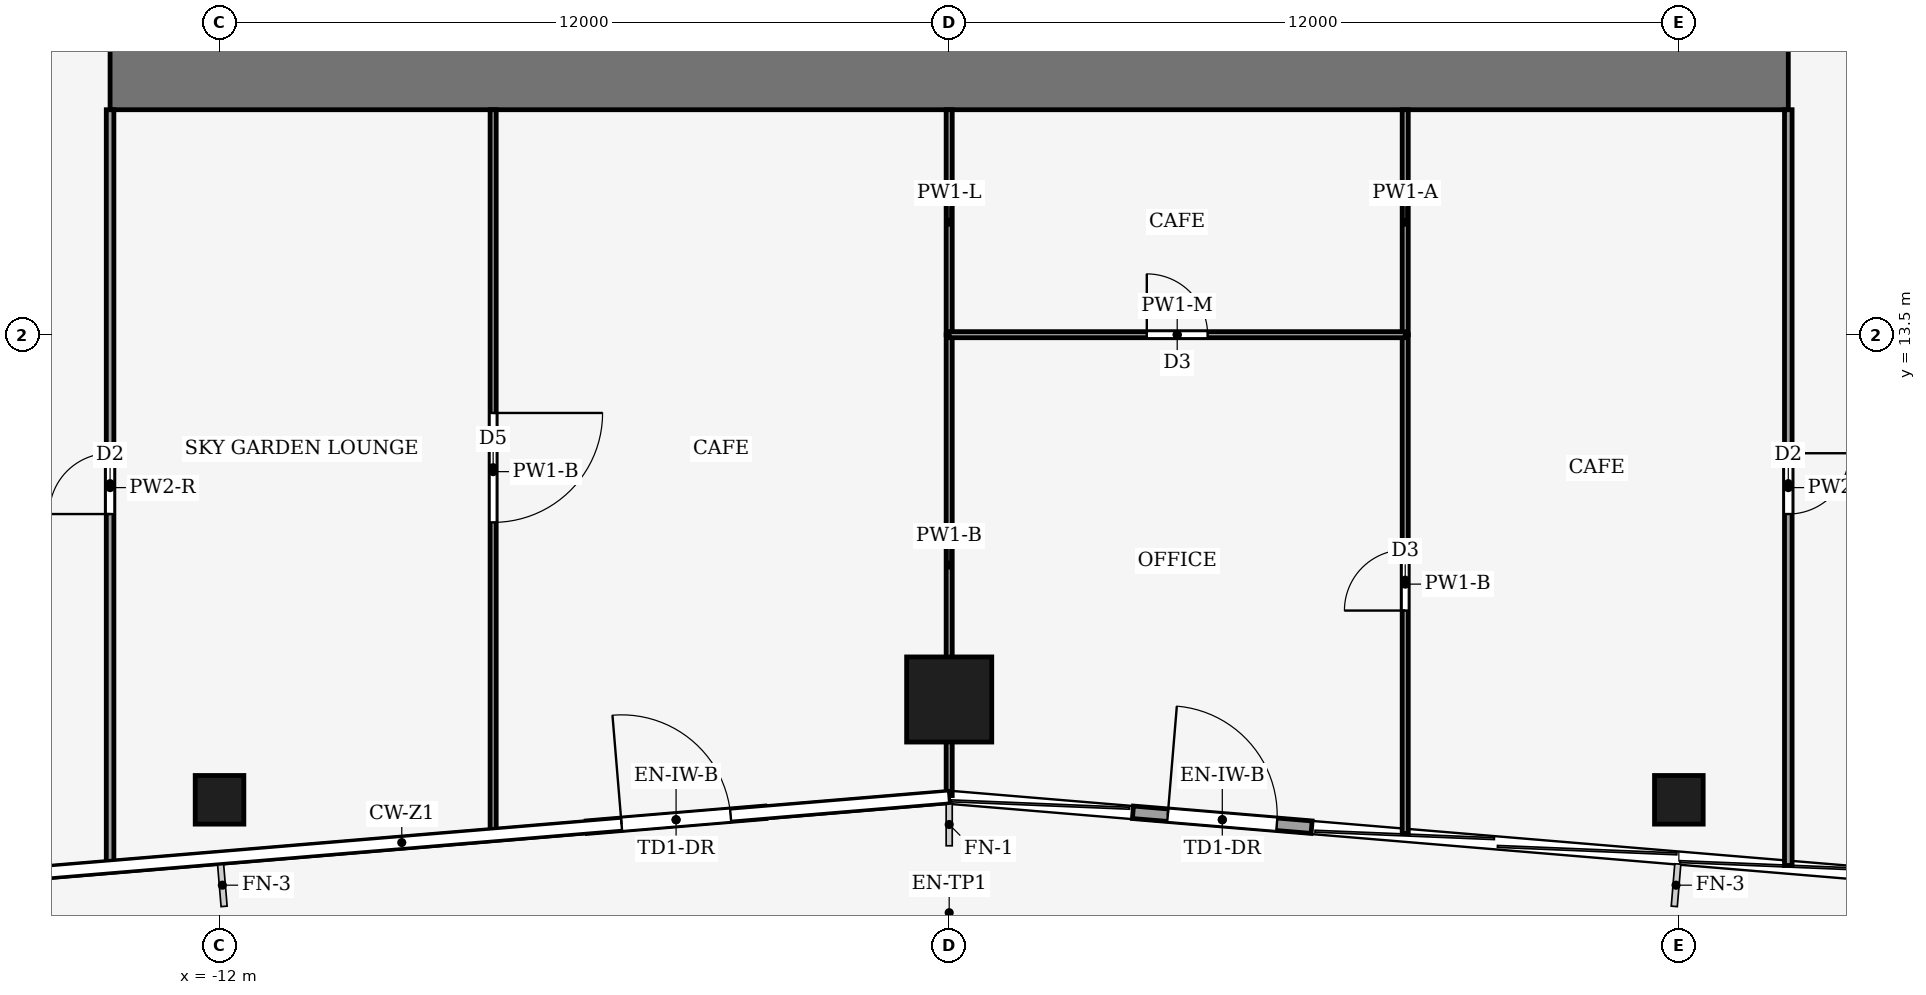
"""IFC4 building model, lengths in metres.
Left out: names, types, materials, properties, quantities, classifications, styles, units other than length and angle.
Written with IfcOpenShell. Run it as: python <this file> out.ifc"""

import sys

from ifc_helpers import new_model, si_unit, direction, frame, frame_2d, origin, origin_2d, place, context, subcontext, project, spatial, rectangle, hollow_rectangle, extrude, element, fill, save


model = new_model("IFC4")
c1 = context("Model", 3, precision=1e-05, world=origin(), true_north=direction((0.0, 1.0)))
c2 = subcontext(c1, "Body", "Model", "MODEL_VIEW")
j1 = project(units=[si_unit("LENGTHUNIT", "METRE"), si_unit("PLANEANGLEUNIT", "RADIAN")], contexts=[c1])
p1 = place(None, origin())
s1 = spatial("IfcSite", under=j1, at=p1, CompositionType="ELEMENT")
p2 = place(p1, origin())
s2 = spatial("IfcBuilding", under=s1, at=p2, CompositionType="ELEMENT")
p3 = place(p2, frame((0.0, 0.0, 65.0)))
s3 = spatial("IfcBuildingStorey", under=s2, at=p3, CompositionType="ELEMENT", Elevation=65.0)
p4 = place(p3, frame((-13.8, 17.8, -0.13), z_axis=(0.0, 0.0, 1.0), x_axis=(1.0, 0.0, 0.0)))
e1 = element("IfcWall", 1, at=p4, inside=s3, PredefinedType="SHEAR", context=c2, shape_type="SweptSolid", body=[
    extrude(rectangle(XDim=27.6, YDim=1.2, at=frame_2d((13.8, 0.0))), origin(), (0.0, 0.0, 1.0), 5.0),
])
p5 = place(p3, frame((0.0, 7.5, 0.0), z_axis=(0.0, 0.0, 1.0), x_axis=(1.0, 0.0, 0.0)))
e2 = element("IfcColumn", 2, at=p5, inside=s3, PredefinedType="COLUMN", context=c2, shape_type="SweptSolid", body=[
    extrude(hollow_rectangle(XDim=1.4, YDim=1.4, WallThickness=0.08, at=origin_2d()), origin(), (0.0, 0.0, 1.0), 5.0),
])
for number, where, z_axis, x_axis in (
    (3, (-12.0, 5.85, 0.0), (0.0, 0.0, 1.0), (1.0, 0.0, 0.0)),
    (4, (12.0, 5.85, 0.0), (0.0, 0.0, 1.0), (1.0, 0.0, 0.0)),
):
    element("IfcColumn", number, at=place(p3, frame(where, z_axis=z_axis, x_axis=x_axis)), inside=s3, PredefinedType="COLUMN", context=c2, shape_type="SweptSolid", body=[
        extrude(hollow_rectangle(XDim=0.8, YDim=0.8, WallThickness=0.04, at=origin_2d()), origin(), (0.0, 0.0, 1.0), 5.0),
    ])
p6 = place(p3, frame((-5.96, 5.4, 0.0), z_axis=(0.0, 0.0, 1.0), x_axis=(0.996544615933, 0.083059186453, 0.0)))
e5 = element("IfcWall", 5, at=p6, inside=s3, PredefinedType="SOLIDWALL", context=c2, shape_type="SweptSolid", body=[
    extrude(rectangle(XDim=2.948, YDim=0.206, at=frame_2d((1.474, 0.0))), origin(), (0.0, 0.0, 1.0), 4.65),
])
p7 = place(p6, frame((0.574, 0.0, 0.0)))
e6 = element("IfcOpeningElement", 6, at=p7, cuts=e5, PredefinedType="OPENING", context=c2, shape_type="SweptSolid", body=[
    extrude(rectangle(XDim=1.8, YDim=2.4, at=frame_2d((0.9, 1.2))), frame((0.0, 0.113, 0.0), z_axis=(0.0, -1.0, 0.0), x_axis=(1.0, 0.0, 0.0)), (0.0, 0.0, 1.0), 0.226),
])
p8 = place(p3, frame((3.022, 5.645, 0.0), z_axis=(0.0, 0.0, 1.0), x_axis=(0.996544615933, -0.083059186453, 0.0)))
e7 = element("IfcWall", 7, at=p8, inside=s3, PredefinedType="SOLIDWALL", context=c2, shape_type="SweptSolid", body=[
    extrude(rectangle(XDim=2.948, YDim=0.206, at=frame_2d((1.474, 0.0))), origin(), (0.0, 0.0, 1.0), 4.65),
])
p9 = place(p8, frame((0.574, 0.0, 0.0)))
e8 = element("IfcOpeningElement", 8, at=p9, cuts=e7, PredefinedType="OPENING", context=c2, shape_type="SweptSolid", body=[
    extrude(rectangle(XDim=1.8, YDim=2.4, at=frame_2d((0.9, 1.2))), frame((0.0, 0.113, 0.0), z_axis=(0.0, -1.0, 0.0), x_axis=(1.0, 0.0, 0.0)), (0.0, 0.0, 1.0), 0.226),
])
p10 = place(p3, frame((-13.8, 4.77, 0.0), z_axis=(0.0, 0.0, 1.0), x_axis=(0.0, 1.0, 0.0)))
e9 = element("IfcWall", 9, at=p10, inside=s3, PredefinedType="PARTITIONING", context=c2, shape_type="SweptSolid", body=[
    extrude(rectangle(XDim=12.43, YDim=0.125, at=frame_2d((6.215, 0.0))), origin(), (0.0, 0.0, 1.0), 4.04),
])
p11 = place(p10, frame((5.78, 0.0, 0.0)))
e10 = element("IfcOpeningElement", 10, at=p11, cuts=e9, PredefinedType="OPENING", context=c2, shape_type="SweptSolid", body=[
    extrude(rectangle(XDim=1.0, YDim=2.1, at=frame_2d((0.5, 1.05))), frame((0.0, 0.073, 0.0), z_axis=(0.0, -1.0, 0.0), x_axis=(1.0, 0.0, 0.0)), (0.0, 0.0, 1.0), 0.145),
])
p12 = place(p3, frame((13.8, 17.2, 0.0), z_axis=(0.0, 0.0, 1.0), x_axis=(0.0, -1.0, 0.0)))
e11 = element("IfcWall", 11, at=p12, inside=s3, PredefinedType="PARTITIONING", context=c2, shape_type="SweptSolid", body=[
    extrude(rectangle(XDim=12.43, YDim=0.125, at=frame_2d((6.215, 0.0))), origin(), (0.0, 0.0, 1.0), 4.04),
])
p13 = place(p12, frame((5.65, 0.0, 0.0)))
e12 = element("IfcOpeningElement", 12, at=p13, cuts=e11, PredefinedType="OPENING", context=c2, shape_type="SweptSolid", body=[
    extrude(rectangle(XDim=1.0, YDim=2.1, at=frame_2d((0.5, 1.05))), frame((0.0, 0.073, 0.0), z_axis=(0.0, -1.0, 0.0), x_axis=(1.0, 0.0, 0.0)), (0.0, 0.0, 1.0), 0.145),
])
p14 = place(p3, frame((-7.5, 17.2, 0.0), z_axis=(0.0, 0.0, 1.0), x_axis=(0.0, -1.0, 0.0)))
e13 = element("IfcWall", 13, at=p14, inside=s3, PredefinedType="PARTITIONING", context=c2, shape_type="SweptSolid", body=[
    extrude(rectangle(XDim=11.905, YDim=0.1, at=frame_2d((5.953, 0.0))), origin(), (0.0, 0.0, 1.0), 4.04),
])
p15 = place(p14, frame((4.987, 0.0, 0.0)))
e14 = element("IfcOpeningElement", 14, at=p15, cuts=e13, PredefinedType="OPENING", context=c2, shape_type="SweptSolid", body=[
    extrude(rectangle(XDim=1.8, YDim=2.1, at=frame_2d((0.9, 1.05))), frame((0.0, 0.06, 0.0), z_axis=(0.0, -1.0, 0.0), x_axis=(1.0, 0.0, 0.0)), (0.0, 0.0, 1.0), 0.12),
])
p16 = place(p3, frame((0.0, 5.92, 0.0), z_axis=(0.0, 0.0, 1.0), x_axis=(0.0, 1.0, 0.0)))
e15 = element("IfcWall", 15, at=p16, inside=s3, PredefinedType="PARTITIONING", context=c2, shape_type="SweptSolid", body=[
    extrude(rectangle(XDim=7.58, YDim=0.1, at=frame_2d((3.79, 0.0))), origin(), (0.0, 0.0, 1.0), 4.04),
])
p17 = place(p3, frame((0.0, 13.5, 0.0), z_axis=(0.0, 0.0, 1.0), x_axis=(0.0, 1.0, 0.0)))
e16 = element("IfcWall", 16, at=p17, inside=s3, PredefinedType="PARTITIONING", context=c2, shape_type="SweptSolid", body=[
    extrude(rectangle(XDim=3.7, YDim=0.1, at=frame_2d((1.85, 0.0))), origin(), (0.0, 0.0, 1.0), 4.48),
])
p18 = place(p3, frame((7.5, 5.295, 0.0), z_axis=(0.0, 0.0, 1.0), x_axis=(0.0, 1.0, 0.0)))
e17 = element("IfcWall", 17, at=p18, inside=s3, PredefinedType="PARTITIONING", context=c2, shape_type="SweptSolid", body=[
    extrude(rectangle(XDim=8.205, YDim=0.1, at=frame_2d((4.103, 0.0))), origin(), (0.0, 0.0, 1.0), 4.04),
])
p19 = place(p18, frame((3.667, 0.0, 0.0)))
e18 = element("IfcOpeningElement", 18, at=p19, cuts=e17, PredefinedType="OPENING", context=c2, shape_type="SweptSolid", body=[
    extrude(rectangle(XDim=1.0, YDim=2.1, at=frame_2d((0.5, 1.05))), frame((0.0, 0.06, 0.0), z_axis=(0.0, -1.0, 0.0), x_axis=(1.0, 0.0, 0.0)), (0.0, 0.0, 1.0), 0.12),
])
p20 = place(p3, frame((7.5, 17.2, 0.0), z_axis=(0.0, 0.0, 1.0), x_axis=(0.0, -1.0, 0.0)))
e19 = element("IfcWall", 19, at=p20, inside=s3, PredefinedType="PARTITIONING", context=c2, shape_type="SweptSolid", body=[
    extrude(rectangle(XDim=3.7, YDim=0.1, at=frame_2d((1.85, 0.0))), origin(), (0.0, 0.0, 1.0), 4.87),
])
p21 = place(p3, frame((0.0, 13.5, 0.0), z_axis=(0.0, 0.0, 1.0), x_axis=(1.0, 0.0, 0.0)))
e20 = element("IfcWall", 20, at=p21, inside=s3, PredefinedType="PARTITIONING", context=c2, shape_type="SweptSolid", body=[
    extrude(rectangle(XDim=7.5, YDim=0.1, at=frame_2d((3.75, 0.0))), origin(), (0.0, 0.0, 1.0), 4.44),
])
p22 = place(p21, frame((3.25, 0.0, 0.0)))
e21 = element("IfcOpeningElement", 21, at=p22, cuts=e20, PredefinedType="OPENING", context=c2, shape_type="SweptSolid", body=[
    extrude(rectangle(XDim=1.0, YDim=2.1, at=frame_2d((0.5, 1.05))), frame((0.0, 0.06, 0.0), z_axis=(0.0, -1.0, 0.0), x_axis=(1.0, 0.0, 0.0)), (0.0, 0.0, 1.0), 0.12),
])
p23 = place(p7, origin())
e22 = element("IfcDoor", 22, at=p23, inside=s3, OperationType="DOUBLE_DOOR_SINGLE_SWING", PredefinedType="DOOR", context=c2, shape_type="SweptSolid", body=[
    extrude(rectangle(XDim=1.8, YDim=2.4, at=frame_2d((0.9, 1.2))), frame((0.0, 0.025, 0.0), z_axis=(0.0, -1.0, 0.0), x_axis=(1.0, 0.0, 0.0)), (0.0, 0.0, 1.0), 0.05),
])
fill(e6, e22)
p24 = place(p9, origin())
e23 = element("IfcDoor", 23, at=p24, inside=s3, OperationType="DOUBLE_DOOR_SINGLE_SWING", PredefinedType="DOOR", context=c2, shape_type="SweptSolid", body=[
    extrude(rectangle(XDim=1.8, YDim=2.4, at=frame_2d((0.9, 1.2))), frame((0.0, 0.025, 0.0), z_axis=(0.0, -1.0, 0.0), x_axis=(1.0, 0.0, 0.0)), (0.0, 0.0, 1.0), 0.05),
])
fill(e8, e23)
p25 = place(p11, origin())
e24 = element("IfcDoor", 24, at=p25, inside=s3, OperationType="SINGLE_SWING_RIGHT", PredefinedType="DOOR", context=c2, shape_type="SweptSolid", body=[
    extrude(rectangle(XDim=1.0, YDim=2.1, at=frame_2d((0.5, 1.05))), frame((0.0, 0.025, 0.0), z_axis=(0.0, -1.0, 0.0), x_axis=(1.0, 0.0, 0.0)), (0.0, 0.0, 1.0), 0.05),
])
fill(e10, e24)
p26 = place(p13, origin())
e25 = element("IfcDoor", 25, at=p26, inside=s3, OperationType="SINGLE_SWING_LEFT", PredefinedType="DOOR", context=c2, shape_type="SweptSolid", body=[
    extrude(rectangle(XDim=1.0, YDim=2.1, at=frame_2d((0.5, 1.05))), frame((0.0, 0.025, 0.0), z_axis=(0.0, -1.0, 0.0), x_axis=(1.0, 0.0, 0.0)), (0.0, 0.0, 1.0), 0.05),
])
fill(e12, e25)
p27 = place(p15, origin())
e26 = element("IfcDoor", 26, at=p27, inside=s3, OperationType="DOUBLE_DOOR_SINGLE_SWING", PredefinedType="DOOR", context=c2, shape_type="SweptSolid", body=[
    extrude(rectangle(XDim=1.8, YDim=2.1, at=frame_2d((0.9, 1.05))), frame((0.0, 0.025, 0.0), z_axis=(0.0, -1.0, 0.0), x_axis=(1.0, 0.0, 0.0)), (0.0, 0.0, 1.0), 0.05),
])
fill(e14, e26)
p28 = place(p19, origin())
e27 = element("IfcDoor", 27, at=p28, inside=s3, OperationType="SINGLE_SWING_RIGHT", PredefinedType="DOOR", context=c2, shape_type="SweptSolid", body=[
    extrude(rectangle(XDim=1.0, YDim=2.1, at=frame_2d((0.5, 1.05))), frame((0.0, 0.025, 0.0), z_axis=(0.0, -1.0, 0.0), x_axis=(1.0, 0.0, 0.0)), (0.0, 0.0, 1.0), 0.05),
])
fill(e18, e27)
p29 = place(p22, origin())
e28 = element("IfcDoor", 28, at=p29, inside=s3, OperationType="SINGLE_SWING_LEFT", PredefinedType="DOOR", context=c2, shape_type="SweptSolid", body=[
    extrude(rectangle(XDim=1.0, YDim=2.1, at=frame_2d((0.5, 1.05))), frame((0.0, 0.025, 0.0), z_axis=(0.0, -1.0, 0.0), x_axis=(1.0, 0.0, 0.0)), (0.0, 0.0, 1.0), 0.05),
])
fill(e21, e28)
save(model, sys.argv[1])
